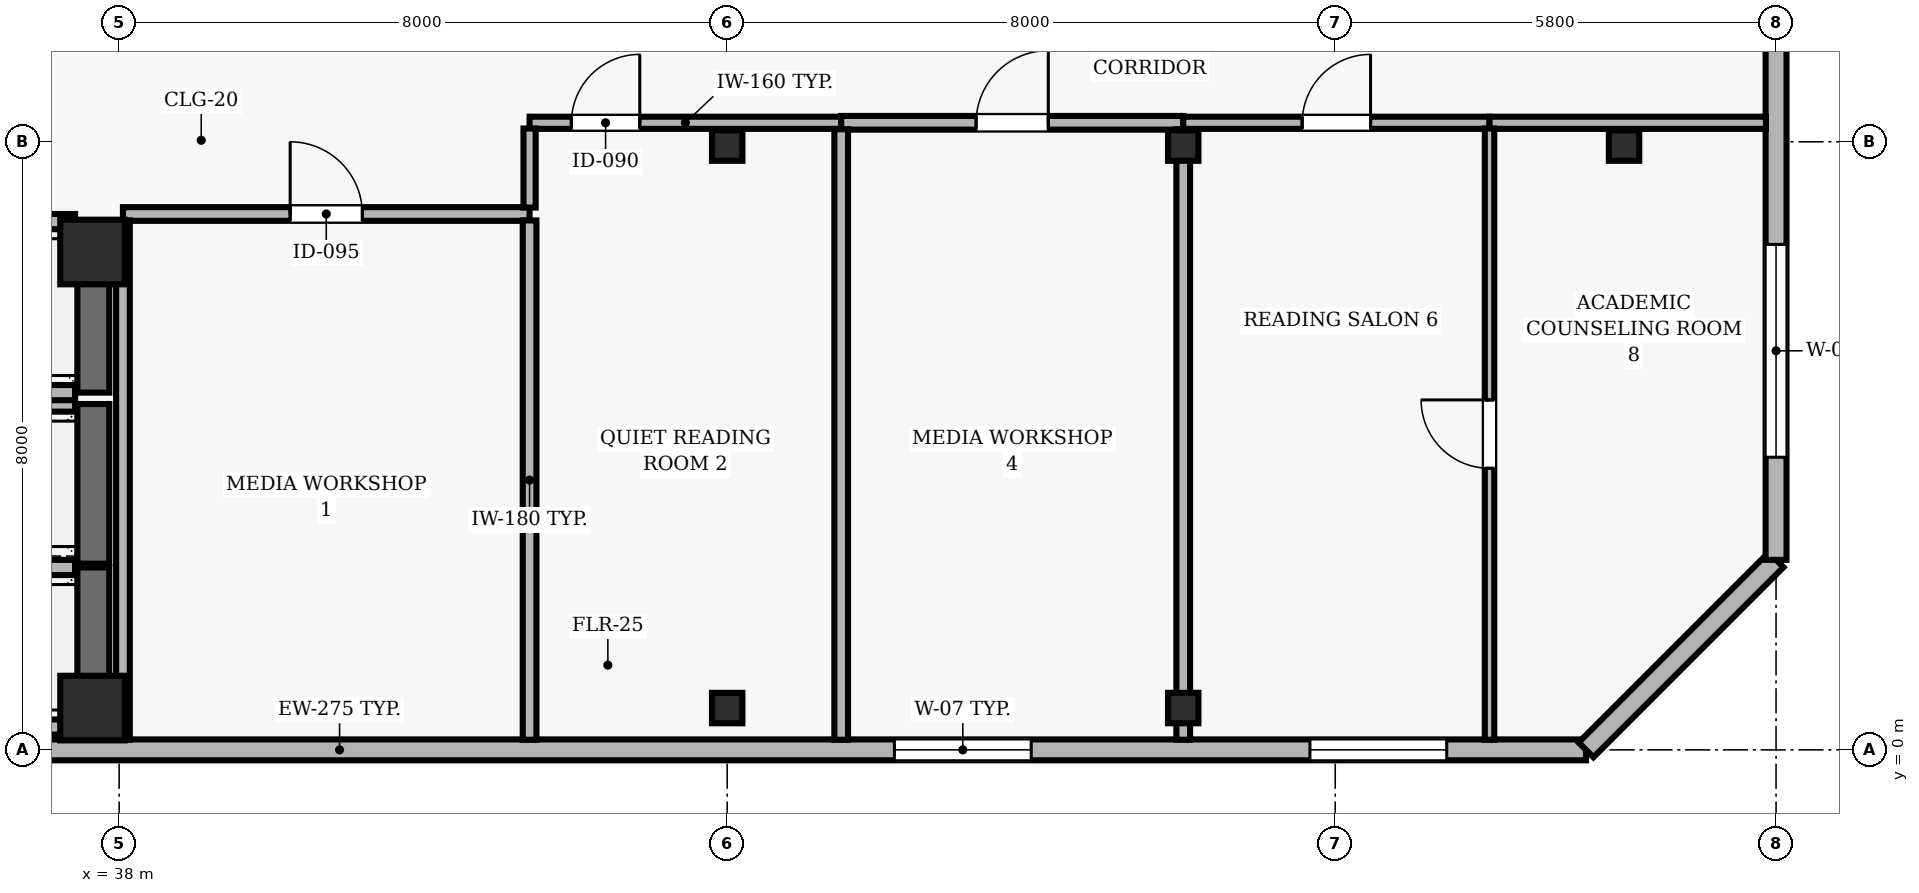
"""IFC4 building model, lengths in metres.
Left out: names, types, materials, properties, quantities, classifications, styles, units other than length and angle.
Written with IfcOpenShell. Run it as: python <this file> out.ifc"""

import sys

from ifc_helpers import new_model, si_unit, direction, frame, frame_2d, origin, origin_2d, place, context, subcontext, project, spatial, rectangle, hollow_rectangle, extrude, element, fill, save


model = new_model("IFC4")
c1 = context("Model", 3, precision=1e-05, world=origin(), true_north=direction((0.0, 1.0)))
c2 = subcontext(c1, "Body", "Model", "MODEL_VIEW")
j1 = project(units=[si_unit("LENGTHUNIT", "METRE"), si_unit("PLANEANGLEUNIT", "RADIAN")], contexts=[c1])
p1 = place(None, origin())
s1 = spatial("IfcSite", under=j1, at=p1, CompositionType="ELEMENT")
p2 = place(p1, origin())
s2 = spatial("IfcBuilding", under=s1, at=p2, CompositionType="ELEMENT")
p3 = place(p2, frame((0.0, 0.0, 271.6)))
s3 = spatial("IfcBuildingStorey", under=s2, at=p3, CompositionType="ELEMENT", Elevation=271.6)
for number, where, z_axis, x_axis in (
    (1, (37.65, 0.55, 0.0), (0.0, 0.0, 1.0), (1.0, 0.0, 0.0)),
    (2, (37.65, 6.55, 0.0), (0.0, 0.0, 1.0), (1.0, 0.0, 0.0)),
):
    element("IfcColumn", number, at=place(p3, frame(where, z_axis=z_axis, x_axis=x_axis)), inside=s3, PredefinedType="COLUMN", context=c2, shape_type="SweptSolid", body=[
        extrude(rectangle(XDim=0.85, YDim=0.85, at=origin_2d()), origin(), (0.0, 0.0, 1.0), 3.9),
    ])
for number, where, z_axis, x_axis in (
    (3, (46.0, 0.55, 0.0), (0.0, 0.0, 1.0), (1.0, 0.0, 0.0)),
    (4, (46.0, 7.95, 0.0), (0.0, 0.0, 1.0), (1.0, 0.0, 0.0)),
    (5, (52.0, 0.55, 0.0), (0.0, 0.0, 1.0), (1.0, 0.0, 0.0)),
    (6, (52.0, 7.95, 0.0), (0.0, 0.0, 1.0), (1.0, 0.0, 0.0)),
    (7, (57.8, 7.95, 0.0), (0.0, 0.0, 1.0), (1.0, 0.0, 0.0)),
):
    element("IfcColumn", number, at=place(p3, frame(where, z_axis=z_axis, x_axis=x_axis)), inside=s3, PredefinedType="COLUMN", context=c2, shape_type="SweptSolid", body=[
        extrude(hollow_rectangle(XDim=0.4, YDim=0.4, WallThickness=0.02, at=origin_2d()), origin(), (0.0, 0.0, 1.0), 3.9),
    ])
p4 = place(p3, frame((24.5, 0.0, 0.0), z_axis=(0.0, 0.0, 1.0), x_axis=(1.0, 0.0, 0.0)))
e8 = element("IfcWall", 8, at=p4, inside=s3, PredefinedType="SOLIDWALL", context=c2, shape_type="SweptSolid", body=[
    extrude(rectangle(XDim=32.8, YDim=0.275, at=frame_2d((16.4, 0.0))), origin(), (0.0, 0.0, 1.0), 3.69),
])
p5 = place(p4, frame((1.833, 0.0, 0.9)))
e9 = element("IfcOpeningElement", 9, at=p5, cuts=e8, PredefinedType="OPENING", context=c2, shape_type="SweptSolid", body=[
    extrude(rectangle(XDim=1.8, YDim=1.8, at=frame_2d((0.9, 0.9))), frame((0.0, 0.147, 0.0), z_axis=(0.0, -1.0, 0.0), x_axis=(1.0, 0.0, 0.0)), (0.0, 0.0, 1.0), 0.295),
])
p6 = place(p4, frame((8.2, 0.0, 0.9)))
e10 = element("IfcOpeningElement", 10, at=p6, cuts=e8, PredefinedType="OPENING", context=c2, shape_type="SweptSolid", body=[
    extrude(rectangle(XDim=1.8, YDim=1.8, at=frame_2d((0.9, 0.9))), frame((0.0, 0.147, 0.0), z_axis=(0.0, -1.0, 0.0), x_axis=(1.0, 0.0, 0.0)), (0.0, 0.0, 1.0), 0.295),
])
p7 = place(p4, frame((23.7, 0.0, 0.9)))
e11 = element("IfcOpeningElement", 11, at=p7, cuts=e8, PredefinedType="OPENING", context=c2, shape_type="SweptSolid", body=[
    extrude(rectangle(XDim=1.8, YDim=1.8, at=frame_2d((0.9, 0.9))), frame((0.0, 0.147, 0.0), z_axis=(0.0, -1.0, 0.0), x_axis=(1.0, 0.0, 0.0)), (0.0, 0.0, 1.0), 0.295),
])
p8 = place(p4, frame((29.167, 0.0, 0.9)))
e12 = element("IfcOpeningElement", 12, at=p8, cuts=e8, PredefinedType="OPENING", context=c2, shape_type="SweptSolid", body=[
    extrude(rectangle(XDim=1.8, YDim=1.8, at=frame_2d((0.9, 0.9))), frame((0.0, 0.147, 0.0), z_axis=(0.0, -1.0, 0.0), x_axis=(1.0, 0.0, 0.0)), (0.0, 0.0, 1.0), 0.295),
])
p9 = place(p3, frame((57.3, 0.0, 0.0), z_axis=(0.0, 0.0, 1.0), x_axis=(0.707106781187, 0.707106781187, 0.0)))
e13 = element("IfcWall", 13, at=p9, inside=s3, PredefinedType="SOLIDWALL", context=c2, shape_type="SweptSolid", body=[
    extrude(rectangle(XDim=3.536, YDim=0.275, at=frame_2d((1.768, 0.0))), origin(), (0.0, 0.0, 1.0), 3.69),
])
p10 = place(p3, frame((59.8, 2.5, 0.0), z_axis=(0.0, 0.0, 1.0), x_axis=(0.0, 1.0, 0.0)))
e14 = element("IfcWall", 14, at=p10, inside=s3, PredefinedType="SOLIDWALL", context=c2, shape_type="SweptSolid", body=[
    extrude(rectangle(XDim=11.0, YDim=0.275, at=frame_2d((5.5, 0.0))), origin(), (0.0, 0.0, 1.0), 3.69),
])
p11 = place(p10, frame((1.35, 0.0, 0.9)))
e15 = element("IfcOpeningElement", 15, at=p11, cuts=e14, PredefinedType="OPENING", context=c2, shape_type="SweptSolid", body=[
    extrude(rectangle(XDim=2.8, YDim=1.8, at=frame_2d((1.4, 0.9))), frame((0.0, 0.147, 0.0), z_axis=(0.0, -1.0, 0.0), x_axis=(1.0, 0.0, 0.0)), (0.0, 0.0, 1.0), 0.295),
])
p12 = place(p3, frame((37.66, 0.3, 0.0), z_axis=(0.0, 0.0, 1.0), x_axis=(0.0, 1.0, 0.0)))
e16 = element("IfcWall", 16, at=p12, inside=s3, PredefinedType="SHEAR", context=c2, shape_type="SweptSolid", body=[
    extrude(rectangle(XDim=2.1, YDim=0.42, at=frame_2d((1.05, 0.0))), origin(), (0.0, 0.0, 1.0), 3.69),
])
for number, where, z_axis, x_axis in (
    (17, (35.28, 0.3, 0.0), (0.0, 0.0, 1.0), (1.0, 0.0, 0.0)),
    (18, (37.42, 2.4, 0.0), (0.0, 0.0, 1.0), (-1.0, 0.0, 0.0)),
):
    element("IfcWall", number, at=place(p3, frame(where, z_axis=z_axis, x_axis=x_axis)), inside=s3, PredefinedType="SOLIDWALL", context=c2, shape_type="SweptSolid", body=[
        extrude(rectangle(XDim=2.14, YDim=0.2, at=frame_2d((1.07, 0.0))), origin(), (0.0, 0.0, 1.0), 3.69),
    ])
p13 = place(p3, frame((37.66, 2.45, 0.0), z_axis=(0.0, 0.0, 1.0), x_axis=(0.0, 1.0, 0.0)))
e19 = element("IfcWall", 19, at=p13, inside=s3, PredefinedType="SHEAR", context=c2, shape_type="SweptSolid", body=[
    extrude(rectangle(XDim=2.1, YDim=0.42, at=frame_2d((1.05, 0.0))), origin(), (0.0, 0.0, 1.0), 3.69),
])
p14 = place(p3, frame((37.42, 4.55, 0.0), z_axis=(0.0, 0.0, 1.0), x_axis=(-1.0, 0.0, 0.0)))
e20 = element("IfcWall", 20, at=p14, inside=s3, PredefinedType="SOLIDWALL", context=c2, shape_type="SweptSolid", body=[
    extrude(rectangle(XDim=2.14, YDim=0.2, at=frame_2d((1.07, 0.0))), origin(), (0.0, 0.0, 1.0), 3.69),
])
p15 = place(p3, frame((37.66, 4.7, 0.0), z_axis=(0.0, 0.0, 1.0), x_axis=(0.0, 1.0, 0.0)))
e21 = element("IfcWall", 21, at=p15, inside=s3, PredefinedType="SHEAR", context=c2, shape_type="SweptSolid", body=[
    extrude(rectangle(XDim=2.25, YDim=0.42, at=frame_2d((1.125, 0.0))), origin(), (0.0, 0.0, 1.0), 3.69),
])
for number, where, z_axis, x_axis in (
    (22, (35.28, 4.7, 0.0), (0.0, 0.0, 1.0), (1.0, 0.0, 0.0)),
    (23, (37.42, 6.95, 0.0), (0.0, 0.0, 1.0), (-1.0, 0.0, 0.0)),
):
    element("IfcWall", number, at=place(p3, frame(where, z_axis=z_axis, x_axis=x_axis)), inside=s3, PredefinedType="SOLIDWALL", context=c2, shape_type="SweptSolid", body=[
        extrude(rectangle(XDim=2.14, YDim=0.2, at=frame_2d((1.07, 0.0))), origin(), (0.0, 0.0, 1.0), 3.69),
    ])
p16 = place(p3, frame((38.05, 7.05, 0.0), z_axis=(0.0, 0.0, 1.0), x_axis=(1.0, 0.0, 0.0)))
e24 = element("IfcWall", 24, at=p16, inside=s3, PredefinedType="PARTITIONING", context=c2, shape_type="SweptSolid", body=[
    extrude(rectangle(XDim=5.35, YDim=0.18, at=frame_2d((2.675, 0.0))), origin(), (0.0, 0.0, 1.0), 3.69),
])
p17 = place(p16, frame((2.2, 0.0, 0.0)))
e25 = element("IfcOpeningElement", 25, at=p17, cuts=e24, PredefinedType="OPENING", context=c2, shape_type="SweptSolid", body=[
    extrude(rectangle(XDim=0.95, YDim=2.1, at=frame_2d((0.475, 1.05))), frame((0.0, 0.1, 0.0), z_axis=(0.0, -1.0, 0.0), x_axis=(1.0, 0.0, 0.0)), (0.0, 0.0, 1.0), 0.2),
])
p18 = place(p3, frame((43.4, 8.25, 0.0), z_axis=(0.0, 0.0, 1.0), x_axis=(1.0, 0.0, 0.0)))
e26 = element("IfcWall", 26, at=p18, inside=s3, PredefinedType="PARTITIONING", context=c2, shape_type="SweptSolid", body=[
    extrude(rectangle(XDim=4.1, YDim=0.16, at=frame_2d((2.05, 0.0))), origin(), (0.0, 0.0, 1.0), 3.221),
])
p19 = place(p18, frame((0.55, 0.0, 0.0)))
e27 = element("IfcOpeningElement", 27, at=p19, cuts=e26, PredefinedType="OPENING", context=c2, shape_type="SweptSolid", body=[
    extrude(rectangle(XDim=0.9, YDim=2.1, at=frame_2d((0.45, 1.05))), frame((0.0, 0.09, 0.0), z_axis=(0.0, -1.0, 0.0), x_axis=(1.0, 0.0, 0.0)), (0.0, 0.0, 1.0), 0.18),
])
p20 = place(p3, frame((47.5, 8.25, 0.0), z_axis=(0.0, 0.0, 1.0), x_axis=(1.0, 0.0, 0.0)))
e28 = element("IfcWall", 28, at=p20, inside=s3, PredefinedType="PARTITIONING", context=c2, shape_type="SweptSolid", body=[
    extrude(rectangle(XDim=4.5, YDim=0.18, at=frame_2d((2.25, 0.0))), origin(), (0.0, 0.0, 1.0), 3.221),
])
p21 = place(p20, frame((1.775, 0.0, 0.0)))
e29 = element("IfcOpeningElement", 29, at=p21, cuts=e28, PredefinedType="OPENING", context=c2, shape_type="SweptSolid", body=[
    extrude(rectangle(XDim=0.95, YDim=2.1, at=frame_2d((0.475, 1.05))), frame((0.0, 0.1, 0.0), z_axis=(0.0, -1.0, 0.0), x_axis=(1.0, 0.0, 0.0)), (0.0, 0.0, 1.0), 0.2),
])
p22 = place(p3, frame((52.0, 8.25, 0.0), z_axis=(0.0, 0.0, 1.0), x_axis=(1.0, 0.0, 0.0)))
e30 = element("IfcWall", 30, at=p22, inside=s3, PredefinedType="PARTITIONING", context=c2, shape_type="SweptSolid", body=[
    extrude(rectangle(XDim=4.03, YDim=0.16, at=frame_2d((2.015, 0.0))), origin(), (0.0, 0.0, 1.0), 3.221),
])
p23 = place(p22, frame((1.565, 0.0, 0.0)))
e31 = element("IfcOpeningElement", 31, at=p23, cuts=e30, PredefinedType="OPENING", context=c2, shape_type="SweptSolid", body=[
    extrude(rectangle(XDim=0.9, YDim=2.1, at=frame_2d((0.45, 1.05))), frame((0.0, 0.09, 0.0), z_axis=(0.0, -1.0, 0.0), x_axis=(1.0, 0.0, 0.0)), (0.0, 0.0, 1.0), 0.18),
])
p24 = place(p3, frame((56.03, 8.25, 0.0), z_axis=(0.0, 0.0, 1.0), x_axis=(1.0, 0.0, 0.0)))
e32 = element("IfcWall", 32, at=p24, inside=s3, PredefinedType="PARTITIONING", context=c2, shape_type="SweptSolid", body=[
    extrude(rectangle(XDim=3.637, YDim=0.16, at=frame_2d((1.818, 0.0))), origin(), (0.0, 0.0, 1.0), 3.221),
])
p25 = place(p3, frame((38.05, 6.965, 0.0), z_axis=(0.0, 0.0, 1.0), x_axis=(0.0, -1.0, 0.0)))
e33 = element("IfcWall", 33, at=p25, inside=s3, PredefinedType="PARTITIONING", context=c2, shape_type="SweptSolid", body=[
    extrude(rectangle(XDim=6.832, YDim=0.18, at=frame_2d((3.416, 0.0))), origin(), (0.0, 0.0, 1.0), 3.221),
])
p26 = place(p3, frame((43.4, 0.133, 0.0), z_axis=(0.0, 0.0, 1.0), x_axis=(0.0, 1.0, 0.0)))
e34 = element("IfcWall", 34, at=p26, inside=s3, PredefinedType="PARTITIONING", context=c2, shape_type="SweptSolid", body=[
    extrude(rectangle(XDim=6.832, YDim=0.18, at=frame_2d((3.416, 0.0))), origin(), (0.0, 0.0, 1.0), 3.69),
])
p27 = place(p3, frame((43.4, 7.135, 0.0), z_axis=(0.0, 0.0, 1.0), x_axis=(0.0, 1.0, 0.0)))
e35 = element("IfcWall", 35, at=p27, inside=s3, PredefinedType="PARTITIONING", context=c2, shape_type="SweptSolid", body=[
    extrude(rectangle(XDim=1.04, YDim=0.16, at=frame_2d((0.52, 0.0))), origin(), (0.0, 0.0, 1.0), 3.69),
])
p28 = place(p3, frame((47.5, 0.133, 0.0), z_axis=(0.0, 0.0, 1.0), x_axis=(0.0, 1.0, 0.0)))
e36 = element("IfcWall", 36, at=p28, inside=s3, PredefinedType="PARTITIONING", context=c2, shape_type="SweptSolid", body=[
    extrude(rectangle(XDim=8.032, YDim=0.18, at=frame_2d((4.016, 0.0))), origin(), (0.0, 0.0, 1.0), 3.69),
])
p29 = place(p3, frame((52.0, 0.133, 0.0), z_axis=(0.0, 0.0, 1.0), x_axis=(0.0, 1.0, 0.0)))
e37 = element("IfcWall", 37, at=p29, inside=s3, PredefinedType="PARTITIONING", context=c2, shape_type="SweptSolid", body=[
    extrude(rectangle(XDim=8.032, YDim=0.18, at=frame_2d((4.016, 0.0))), origin(), (0.0, 0.0, 1.0), 3.221),
])
p30 = place(p3, frame((56.03, 0.133, 0.0), z_axis=(0.0, 0.0, 1.0), x_axis=(0.0, 1.0, 0.0)))
e38 = element("IfcWall", 38, at=p30, inside=s3, PredefinedType="PARTITIONING", context=c2, shape_type="SweptSolid", body=[
    extrude(rectangle(XDim=8.042, YDim=0.125, at=frame_2d((4.021, 0.0))), origin(), (0.0, 0.0, 1.0), 3.69),
])
p31 = place(p30, frame((3.571, 0.0, 0.0)))
e39 = element("IfcOpeningElement", 39, at=p31, cuts=e38, PredefinedType="OPENING", context=c2, shape_type="SweptSolid", body=[
    extrude(rectangle(XDim=0.9, YDim=2.1, at=frame_2d((0.45, 1.05))), frame((0.0, 0.073, 0.0), z_axis=(0.0, -1.0, 0.0), x_axis=(1.0, 0.0, 0.0)), (0.0, 0.0, 1.0), 0.145),
])
p32 = place(p7, origin())
e40 = element("IfcWindow", 40, at=p32, inside=s3, PartitioningType="SINGLE_PANEL", PredefinedType="WINDOW", context=c2, shape_type="SweptSolid", body=[
    extrude(rectangle(XDim=1.8, YDim=1.8, at=frame_2d((0.9, 0.9))), frame((0.0, 0.03, 0.0), z_axis=(0.0, -1.0, 0.0), x_axis=(1.0, 0.0, 0.0)), (0.0, 0.0, 1.0), 0.06),
])
fill(e11, e40)
p33 = place(p8, origin())
e41 = element("IfcWindow", 41, at=p33, inside=s3, PartitioningType="SINGLE_PANEL", PredefinedType="WINDOW", context=c2, shape_type="SweptSolid", body=[
    extrude(rectangle(XDim=1.8, YDim=1.8, at=frame_2d((0.9, 0.9))), frame((0.0, 0.03, 0.0), z_axis=(0.0, -1.0, 0.0), x_axis=(1.0, 0.0, 0.0)), (0.0, 0.0, 1.0), 0.06),
])
fill(e12, e41)
p34 = place(p11, origin())
e42 = element("IfcWindow", 42, at=p34, inside=s3, PartitioningType="SINGLE_PANEL", PredefinedType="WINDOW", context=c2, shape_type="SweptSolid", body=[
    extrude(rectangle(XDim=2.8, YDim=1.8, at=frame_2d((1.4, 0.9))), frame((0.0, 0.03, 0.0), z_axis=(0.0, -1.0, 0.0), x_axis=(1.0, 0.0, 0.0)), (0.0, 0.0, 1.0), 0.06),
])
fill(e15, e42)
p35 = place(p17, origin())
e43 = element("IfcDoor", 43, at=p35, inside=s3, OperationType="SINGLE_SWING_LEFT", PredefinedType="DOOR", context=c2, shape_type="SweptSolid", body=[
    extrude(rectangle(XDim=0.95, YDim=2.1, at=frame_2d((0.475, 1.05))), frame((0.0, 0.025, 0.0), z_axis=(0.0, -1.0, 0.0), x_axis=(1.0, 0.0, 0.0)), (0.0, 0.0, 1.0), 0.05),
])
fill(e25, e43)
p36 = place(p19, origin())
e44 = element("IfcDoor", 44, at=p36, inside=s3, OperationType="SINGLE_SWING_RIGHT", PredefinedType="DOOR", context=c2, shape_type="SweptSolid", body=[
    extrude(rectangle(XDim=0.9, YDim=2.1, at=frame_2d((0.45, 1.05))), frame((0.0, 0.025, 0.0), z_axis=(0.0, -1.0, 0.0), x_axis=(1.0, 0.0, 0.0)), (0.0, 0.0, 1.0), 0.05),
])
fill(e27, e44)
p37 = place(p21, origin())
e45 = element("IfcDoor", 45, at=p37, inside=s3, OperationType="SINGLE_SWING_RIGHT", PredefinedType="DOOR", context=c2, shape_type="SweptSolid", body=[
    extrude(rectangle(XDim=0.95, YDim=2.1, at=frame_2d((0.475, 1.05))), frame((0.0, 0.025, 0.0), z_axis=(0.0, -1.0, 0.0), x_axis=(1.0, 0.0, 0.0)), (0.0, 0.0, 1.0), 0.05),
])
fill(e29, e45)
p38 = place(p23, origin())
e46 = element("IfcDoor", 46, at=p38, inside=s3, OperationType="SINGLE_SWING_RIGHT", PredefinedType="DOOR", context=c2, shape_type="SweptSolid", body=[
    extrude(rectangle(XDim=0.9, YDim=2.1, at=frame_2d((0.45, 1.05))), frame((0.0, 0.025, 0.0), z_axis=(0.0, -1.0, 0.0), x_axis=(1.0, 0.0, 0.0)), (0.0, 0.0, 1.0), 0.05),
])
fill(e31, e46)
p39 = place(p31, origin())
e47 = element("IfcDoor", 47, at=p39, inside=s3, OperationType="SINGLE_SWING_RIGHT", PredefinedType="DOOR", context=c2, shape_type="SweptSolid", body=[
    extrude(rectangle(XDim=0.9, YDim=2.1, at=frame_2d((0.45, 1.05))), frame((0.0, 0.025, 0.0), z_axis=(0.0, -1.0, 0.0), x_axis=(1.0, 0.0, 0.0)), (0.0, 0.0, 1.0), 0.05),
])
fill(e39, e47)
save(model, sys.argv[1])
